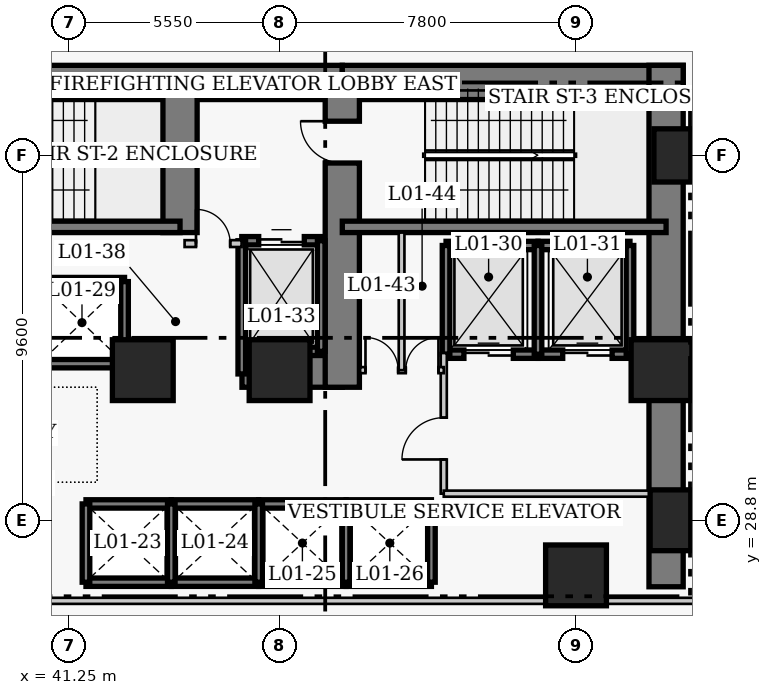
"""IFC4 building model, lengths in metres.
Left out: names, types, materials, properties, quantities, classifications, styles, units other than length and angle.
Written with IfcOpenShell. Run it as: python <this file> out.ifc"""

import sys

from ifc_helpers import new_model, si_unit, direction, frame, frame_2d, origin, origin_2d, place, context, subcontext, project, spatial, rectangle, extrude, element, fill, save


model = new_model("IFC4")
c1 = context("Model", 3, precision=1e-05, world=origin(), true_north=direction((0.0, 1.0)))
c2 = subcontext(c1, "Body", "Model", "MODEL_VIEW")
j1 = project(units=[si_unit("LENGTHUNIT", "METRE"), si_unit("PLANEANGLEUNIT", "RADIAN")], contexts=[c1])
p1 = place(None, origin())
s1 = spatial("IfcSite", under=j1, at=p1, CompositionType="ELEMENT")
p2 = place(p1, origin())
s2 = spatial("IfcBuilding", under=s1, at=p2, CompositionType="ELEMENT")
p3 = place(p2, frame((0.0, 0.0, 5.4)))
s3 = spatial("IfcBuildingStorey", under=s2, at=p3, CompositionType="ELEMENT", Elevation=5.4)
p4 = place(p3, frame((35.85, 40.32, 0.0), z_axis=(0.0, 0.0, 1.0), x_axis=(1.0, 0.0, 0.0)))
e1 = element("IfcWall", 1, at=p4, inside=s3, PredefinedType="SHEAR", context=c2, shape_type="SweptSolid", body=[
    extrude(rectangle(XDim=12.6, YDim=0.9, at=frame_2d((6.3, 0.0))), origin(), (0.0, 0.0, 1.0), 5.0),
])
p5 = place(p3, frame((48.45, 40.32, 0.0), z_axis=(0.0, 0.0, 1.0), x_axis=(1.0, 0.0, 0.0)))
e2 = element("IfcWall", 2, at=p5, inside=s3, PredefinedType="SHEAR", context=c2, shape_type="SweptSolid", body=[
    extrude(rectangle(XDim=8.97, YDim=0.9, at=frame_2d((4.485, 0.0))), origin(), (0.0, 0.0, 1.0), 5.0),
])
p6 = place(p3, frame((56.97, 27.05, 0.0), z_axis=(0.0, 0.0, 1.0), x_axis=(0.0, 1.0, 0.0)))
e3 = element("IfcWall", 3, at=p6, inside=s3, PredefinedType="SHEAR", context=c2, shape_type="SweptSolid", body=[
    extrude(rectangle(XDim=13.72, YDim=0.9, at=frame_2d((6.86, 0.0))), origin(), (0.0, 0.0, 1.0), 5.0),
])
p7 = place(p3, frame((45.81, 32.75, 0.0), z_axis=(0.0, 0.0, 1.0), x_axis=(1.0, 0.0, 0.0)))
e4 = element("IfcWall", 4, at=p7, inside=s3, PredefinedType="SHEAR", context=c2, shape_type="SweptSolid", body=[
    extrude(rectangle(XDim=2.64, YDim=0.9, at=frame_2d((1.32, 0.0))), origin(), (0.0, 0.0, 1.0), 5.0),
])
p8 = place(p3, frame((44.18, 36.37, 0.0), z_axis=(0.0, 0.0, 1.0), x_axis=(0.0, 1.0, 0.0)))
e5 = element("IfcWall", 5, at=p8, inside=s3, PredefinedType="SHEAR", context=c2, shape_type="SweptSolid", body=[
    extrude(rectangle(XDim=3.95, YDim=0.9, at=frame_2d((1.975, 0.0))), origin(), (0.0, 0.0, 1.0), 5.0),
])
p9 = place(p3, frame((48.45, 32.3, 0.0), z_axis=(0.0, 0.0, 1.0), x_axis=(0.0, 1.0, 0.0)))
e6 = element("IfcWall", 6, at=p9, inside=s3, PredefinedType="SHEAR", context=c2, shape_type="SweptSolid", body=[
    extrude(rectangle(XDim=8.02, YDim=0.9, at=frame_2d((4.01, 0.0))), origin(), (0.0, 0.0, 1.0), 5.0),
])
p10 = place(p9, frame((5.9, 0.0, 0.0)))
e7 = element("IfcOpeningElement", 7, at=p10, cuts=e6, PredefinedType="OPENING", context=c2, shape_type="SweptSolid", body=[
    extrude(rectangle(XDim=1.1, YDim=2.15, at=frame_2d((0.55, 1.075))), frame((0.0, 0.46, 0.0), z_axis=(0.0, -1.0, 0.0), x_axis=(1.0, 0.0, 0.0)), (0.0, 0.0, 1.0), 0.92),
])
p11 = place(p3, frame((35.85, 36.52, 0.0), z_axis=(0.0, 0.0, 1.0), x_axis=(1.0, 0.0, 0.0)))
e8 = element("IfcWall", 8, at=p11, inside=s3, PredefinedType="SHEAR", context=c2, shape_type="SweptSolid", body=[
    extrude(rectangle(XDim=8.33, YDim=0.3, at=frame_2d((4.165, 0.0))), origin(), (0.0, 0.0, 1.0), 5.0),
])
p12 = place(p3, frame((48.45, 36.52, 0.0), z_axis=(0.0, 0.0, 1.0), x_axis=(1.0, 0.0, 0.0)))
e9 = element("IfcWall", 9, at=p12, inside=s3, PredefinedType="SHEAR", context=c2, shape_type="SweptSolid", body=[
    extrude(rectangle(XDim=8.52, YDim=0.3, at=frame_2d((4.26, 0.0))), origin(), (0.0, 0.0, 1.0), 5.0),
])
p13 = place(p3, frame((57.35, 28.8, 0.0), z_axis=(0.0, 0.0, 1.0), x_axis=(1.0, 0.0, 0.0)))
e10 = element("IfcColumn", 10, at=p13, inside=s3, PredefinedType="COLUMN", context=c2, shape_type="SweptSolid", body=[
    extrude(rectangle(XDim=1.6, YDim=1.6, at=origin_2d()), origin(), (0.0, 0.0, 1.0), 5.0),
])
p14 = place(p3, frame((57.35, 38.4, 0.0), z_axis=(0.0, 0.0, 1.0), x_axis=(1.0, 0.0, 0.0)))
e11 = element("IfcColumn", 11, at=p14, inside=s3, PredefinedType="COLUMN", context=c2, shape_type="SweptSolid", body=[
    extrude(rectangle(XDim=1.4, YDim=1.4, at=origin_2d()), origin(), (0.0, 0.0, 1.0), 5.0),
])
for number, where, z_axis, x_axis in (
    (12, (43.2, 32.75, 0.0), (0.0, 0.0, 1.0), (1.0, 0.0, 0.0)),
    (13, (46.8, 32.75, 0.0), (0.0, 0.0, 1.0), (1.0, 0.0, 0.0)),
    (14, (54.6, 27.35, 0.0), (0.0, 0.0, 1.0), (1.0, 0.0, 0.0)),
    (15, (56.85, 32.75, 0.0), (0.0, 0.0, 1.0), (1.0, 0.0, 0.0)),
):
    element("IfcColumn", number, at=place(p3, frame(where, z_axis=z_axis, x_axis=x_axis)), inside=s3, PredefinedType="COLUMN", context=c2, shape_type="SweptSolid", body=[
        extrude(rectangle(XDim=1.6, YDim=1.6, at=origin_2d()), origin(), (0.0, 0.0, 1.0), 5.0),
    ])
for number, where, z_axis, x_axis in (
    (16, (41.705, 29.23, 0.0), (0.0, 0.0, 1.0), (1.0, 0.0, 0.0)),
    (17, (41.705, 27.17, 0.0), (0.0, 0.0, 1.0), (1.0, 0.0, 0.0)),
):
    element("IfcWall", number, at=place(p3, frame(where, z_axis=z_axis, x_axis=x_axis)), inside=s3, PredefinedType="SHEAR", context=c2, shape_type="SweptSolid", body=[
        extrude(rectangle(XDim=2.245, YDim=0.22, at=frame_2d((1.123, 0.0))), origin(), (0.0, 0.0, 1.0), 5.0),
    ])
p15 = place(p3, frame((41.705, 27.17, 0.0), z_axis=(0.0, 0.0, 1.0), x_axis=(0.0, 1.0, 0.0)))
e18 = element("IfcWall", 18, at=p15, inside=s3, PredefinedType="SHEAR", context=c2, shape_type="SweptSolid", body=[
    extrude(rectangle(XDim=2.06, YDim=0.2, at=frame_2d((1.03, 0.0))), origin(), (0.0, 0.0, 1.0), 5.0),
])
for number, where, z_axis, x_axis in (
    (19, (43.95, 29.23, 0.0), (0.0, 0.0, 1.0), (1.0, 0.0, 0.0)),
    (20, (43.95, 27.17, 0.0), (0.0, 0.0, 1.0), (1.0, 0.0, 0.0)),
):
    element("IfcWall", number, at=place(p3, frame(where, z_axis=z_axis, x_axis=x_axis)), inside=s3, PredefinedType="SHEAR", context=c2, shape_type="SweptSolid", body=[
        extrude(rectangle(XDim=2.3, YDim=0.22, at=frame_2d((1.15, 0.0))), origin(), (0.0, 0.0, 1.0), 5.0),
    ])
p16 = place(p3, frame((43.95, 27.17, 0.0), z_axis=(0.0, 0.0, 1.0), x_axis=(0.0, 1.0, 0.0)))
e21 = element("IfcWall", 21, at=p16, inside=s3, PredefinedType="SHEAR", context=c2, shape_type="SweptSolid", body=[
    extrude(rectangle(XDim=2.06, YDim=0.2, at=frame_2d((1.03, 0.0))), origin(), (0.0, 0.0, 1.0), 5.0),
])
for number, where, z_axis, x_axis in (
    (22, (46.25, 29.23, 0.0), (0.0, 0.0, 1.0), (1.0, 0.0, 0.0)),
    (23, (46.25, 27.17, 0.0), (0.0, 0.0, 1.0), (1.0, 0.0, 0.0)),
):
    element("IfcWall", number, at=place(p3, frame(where, z_axis=z_axis, x_axis=x_axis)), inside=s3, PredefinedType="SHEAR", context=c2, shape_type="SweptSolid", body=[
        extrude(rectangle(XDim=2.3, YDim=0.22, at=frame_2d((1.15, 0.0))), origin(), (0.0, 0.0, 1.0), 5.0),
    ])
p17 = place(p3, frame((46.25, 27.17, 0.0), z_axis=(0.0, 0.0, 1.0), x_axis=(0.0, 1.0, 0.0)))
e24 = element("IfcWall", 24, at=p17, inside=s3, PredefinedType="SHEAR", context=c2, shape_type="SweptSolid", body=[
    extrude(rectangle(XDim=2.06, YDim=0.2, at=frame_2d((1.03, 0.0))), origin(), (0.0, 0.0, 1.0), 5.0),
])
for number, where, z_axis, x_axis in (
    (25, (48.55, 29.23, 0.0), (0.0, 0.0, 1.0), (1.0, 0.0, 0.0)),
    (26, (48.55, 27.17, 0.0), (0.0, 0.0, 1.0), (1.0, 0.0, 0.0)),
):
    element("IfcWall", number, at=place(p3, frame(where, z_axis=z_axis, x_axis=x_axis)), inside=s3, PredefinedType="SHEAR", context=c2, shape_type="SweptSolid", body=[
        extrude(rectangle(XDim=2.245, YDim=0.22, at=frame_2d((1.123, 0.0))), origin(), (0.0, 0.0, 1.0), 5.0),
    ])
for number, where, z_axis, x_axis in (
    (27, (48.55, 27.17, 0.0), (0.0, 0.0, 1.0), (0.0, 1.0, 0.0)),
    (28, (50.795, 27.17, 0.0), (0.0, 0.0, 1.0), (0.0, 1.0, 0.0)),
):
    element("IfcWall", number, at=place(p3, frame(where, z_axis=z_axis, x_axis=x_axis)), inside=s3, PredefinedType="SHEAR", context=c2, shape_type="SweptSolid", body=[
        extrude(rectangle(XDim=2.06, YDim=0.2, at=frame_2d((1.03, 0.0))), origin(), (0.0, 0.0, 1.0), 5.0),
    ])
for number, where, z_axis, x_axis in (
    (29, (40.4, 35.08, 0.0), (0.0, 0.0, 1.0), (1.0, 0.0, 0.0)),
    (30, (40.4, 32.92, 0.0), (0.0, 0.0, 1.0), (1.0, 0.0, 0.0)),
):
    element("IfcWall", number, at=place(p3, frame(where, z_axis=z_axis, x_axis=x_axis)), inside=s3, PredefinedType="SHEAR", context=c2, shape_type="SweptSolid", body=[
        extrude(rectangle(XDim=2.32, YDim=0.22, at=frame_2d((1.16, 0.0))), origin(), (0.0, 0.0, 1.0), 5.0),
    ])
p18 = place(p3, frame((42.72, 32.92, 0.0), z_axis=(0.0, 0.0, 1.0), x_axis=(0.0, 1.0, 0.0)))
e31 = element("IfcWall", 31, at=p18, inside=s3, PredefinedType="SHEAR", context=c2, shape_type="SweptSolid", body=[
    extrude(rectangle(XDim=2.16, YDim=0.2, at=frame_2d((1.08, 0.0))), origin(), (0.0, 0.0, 1.0), 5.0),
])
p19 = place(p3, frame((51.18, 36.03, 0.0), z_axis=(0.0, 0.0, 1.0), x_axis=(1.0, 0.0, 0.0)))
e32 = element("IfcWall", 32, at=p19, inside=s3, PredefinedType="SHEAR", context=c2, shape_type="SweptSolid", body=[
    extrude(rectangle(XDim=2.42, YDim=0.22, at=frame_2d((1.21, 0.0))), origin(), (0.0, 0.0, 1.0), 5.0),
])
p20 = place(p3, frame((51.18, 33.17, 0.0), z_axis=(0.0, 0.0, 1.0), x_axis=(1.0, 0.0, 0.0)))
e33 = element("IfcWall", 33, at=p20, inside=s3, PredefinedType="SHEAR", context=c2, shape_type="SweptSolid", body=[
    extrude(rectangle(XDim=2.42, YDim=0.22, at=frame_2d((1.21, 0.0))), origin(), (0.0, 0.0, 1.0), 5.0),
])
p21 = place(p20, frame((0.47, 0.0, 0.0)))
e34 = element("IfcOpeningElement", 34, at=p21, cuts=e33, PredefinedType="OPENING", context=c2, shape_type="SweptSolid", body=[
    extrude(rectangle(XDim=1.3, YDim=2.15, at=frame_2d((0.65, 1.075))), frame((0.0, 0.12, 0.0), z_axis=(0.0, -1.0, 0.0), x_axis=(1.0, 0.0, 0.0)), (0.0, 0.0, 1.0), 0.24),
])
p22 = place(p3, frame((51.18, 33.17, 0.0), z_axis=(0.0, 0.0, 1.0), x_axis=(0.0, 1.0, 0.0)))
e35 = element("IfcWall", 35, at=p22, inside=s3, PredefinedType="SHEAR", context=c2, shape_type="SweptSolid", body=[
    extrude(rectangle(XDim=2.86, YDim=0.2, at=frame_2d((1.43, 0.0))), origin(), (0.0, 0.0, 1.0), 5.0),
])
p23 = place(p3, frame((53.6, 36.03, 0.0), z_axis=(0.0, 0.0, 1.0), x_axis=(1.0, 0.0, 0.0)))
e36 = element("IfcWall", 36, at=p23, inside=s3, PredefinedType="SHEAR", context=c2, shape_type="SweptSolid", body=[
    extrude(rectangle(XDim=2.42, YDim=0.22, at=frame_2d((1.21, 0.0))), origin(), (0.0, 0.0, 1.0), 5.0),
])
p24 = place(p3, frame((53.6, 33.17, 0.0), z_axis=(0.0, 0.0, 1.0), x_axis=(1.0, 0.0, 0.0)))
e37 = element("IfcWall", 37, at=p24, inside=s3, PredefinedType="SHEAR", context=c2, shape_type="SweptSolid", body=[
    extrude(rectangle(XDim=2.42, YDim=0.22, at=frame_2d((1.21, 0.0))), origin(), (0.0, 0.0, 1.0), 5.0),
])
p25 = place(p24, frame((0.65, 0.0, 0.0)))
e38 = element("IfcOpeningElement", 38, at=p25, cuts=e37, PredefinedType="OPENING", context=c2, shape_type="SweptSolid", body=[
    extrude(rectangle(XDim=1.3, YDim=2.15, at=frame_2d((0.65, 1.075))), frame((0.0, 0.12, 0.0), z_axis=(0.0, -1.0, 0.0), x_axis=(1.0, 0.0, 0.0)), (0.0, 0.0, 1.0), 0.24),
])
for number, where, z_axis, x_axis in (
    (39, (53.6, 33.17, 0.0), (0.0, 0.0, 1.0), (0.0, 1.0, 0.0)),
    (40, (56.02, 33.17, 0.0), (0.0, 0.0, 1.0), (0.0, 1.0, 0.0)),
):
    element("IfcWall", number, at=place(p3, frame(where, z_axis=z_axis, x_axis=x_axis)), inside=s3, PredefinedType="SHEAR", context=c2, shape_type="SweptSolid", body=[
        extrude(rectangle(XDim=2.86, YDim=0.2, at=frame_2d((1.43, 0.0))), origin(), (0.0, 0.0, 1.0), 5.0),
    ])
p26 = place(p3, frame((45.805, 36.155, 0.0), z_axis=(0.0, 0.0, 1.0), x_axis=(1.0, 0.0, 0.0)))
e41 = element("IfcWall", 41, at=p26, inside=s3, PredefinedType="SHEAR", context=c2, shape_type="SweptSolid", body=[
    extrude(rectangle(XDim=2.09, YDim=0.22, at=frame_2d((1.045, 0.0))), origin(), (0.0, 0.0, 1.0), 5.0),
])
p27 = place(p26, frame((0.445, 0.0, 0.0)))
e42 = element("IfcOpeningElement", 42, at=p27, cuts=e41, PredefinedType="OPENING", context=c2, shape_type="SweptSolid", body=[
    extrude(rectangle(XDim=1.2, YDim=2.15, at=frame_2d((0.6, 1.075))), frame((0.0, 0.12, 0.0), z_axis=(0.0, -1.0, 0.0), x_axis=(1.0, 0.0, 0.0)), (0.0, 0.0, 1.0), 0.24),
])
p28 = place(p3, frame((45.805, 33.245, 0.0), z_axis=(0.0, 0.0, 1.0), x_axis=(1.0, 0.0, 0.0)))
e43 = element("IfcWall", 43, at=p28, inside=s3, PredefinedType="SHEAR", context=c2, shape_type="SweptSolid", body=[
    extrude(rectangle(XDim=2.09, YDim=0.22, at=frame_2d((1.045, 0.0))), origin(), (0.0, 0.0, 1.0), 5.0),
])
p29 = place(p3, frame((45.805, 32.65, 0.0), z_axis=(0.0, 0.0, 1.0), x_axis=(0.0, 1.0, 0.0)))
e44 = element("IfcWall", 44, at=p29, inside=s3, PredefinedType="SHEAR", context=c2, shape_type="SweptSolid", body=[
    extrude(rectangle(XDim=3.505, YDim=0.2, at=frame_2d((1.752, 0.0))), origin(), (0.0, 0.0, 1.0), 5.0),
])
p30 = place(p3, frame((47.895, 33.245, 0.0), z_axis=(0.0, 0.0, 1.0), x_axis=(0.0, 1.0, 0.0)))
e45 = element("IfcWall", 45, at=p30, inside=s3, PredefinedType="SHEAR", context=c2, shape_type="SweptSolid", body=[
    extrude(rectangle(XDim=2.91, YDim=0.2, at=frame_2d((1.455, 0.0))), origin(), (0.0, 0.0, 1.0), 5.0),
])
p31 = place(p3, frame((44.3, 36.08, 0.0), z_axis=(0.0, 0.0, 1.0), x_axis=(1.0, 0.0, 0.0)))
e46 = element("IfcWall", 46, at=p31, inside=s3, PredefinedType="PARTITIONING", context=c2, shape_type="SweptSolid", body=[
    extrude(rectangle(XDim=1.5, YDim=0.18, at=frame_2d((0.75, 0.0))), origin(), (0.0, 0.0, 1.0), 4.65),
])
p32 = place(p31, frame((0.3, 0.0, 0.0)))
e47 = element("IfcOpeningElement", 47, at=p32, cuts=e46, PredefinedType="OPENING", context=c2, shape_type="SweptSolid", body=[
    extrude(rectangle(XDim=0.9, YDim=2.15, at=frame_2d((0.45, 1.075))), frame((0.0, 0.1, 0.0), z_axis=(0.0, -1.0, 0.0), x_axis=(1.0, 0.0, 0.0)), (0.0, 0.0, 1.0), 0.2),
])
p33 = place(p3, frame((51.12, 29.5, 0.0), z_axis=(0.0, 0.0, 1.0), x_axis=(0.0, 1.0, 0.0)))
e48 = element("IfcWall", 48, at=p33, inside=s3, PredefinedType="PARTITIONING", context=c2, shape_type="SweptSolid", body=[
    extrude(rectangle(XDim=3.7, YDim=0.16, at=frame_2d((1.85, 0.0))), origin(), (0.0, 0.0, 1.0), 4.65),
])
p34 = place(p33, frame((0.9, 0.0, 0.0)))
e49 = element("IfcOpeningElement", 49, at=p34, cuts=e48, PredefinedType="OPENING", context=c2, shape_type="SweptSolid", body=[
    extrude(rectangle(XDim=1.1, YDim=2.15, at=frame_2d((0.55, 1.075))), frame((0.0, 0.09, 0.0), z_axis=(0.0, -1.0, 0.0), x_axis=(1.0, 0.0, 0.0)), (0.0, 0.0, 1.0), 0.18),
])
p35 = place(p3, frame((51.12, 29.5, 0.0), z_axis=(0.0, 0.0, 1.0), x_axis=(1.0, 0.0, 0.0)))
e50 = element("IfcWall", 50, at=p35, inside=s3, PredefinedType="PARTITIONING", context=c2, shape_type="SweptSolid", body=[
    extrude(rectangle(XDim=5.63, YDim=0.16, at=frame_2d((2.815, 0.0))), origin(), (0.0, 0.0, 1.0), 4.65),
])
p36 = place(p3, frame((48.92, 32.75, 0.0), z_axis=(0.0, 0.0, 1.0), x_axis=(1.0, 0.0, 0.0)))
e51 = element("IfcWall", 51, at=p36, inside=s3, PredefinedType="PARTITIONING", context=c2, shape_type="SweptSolid", body=[
    extrude(rectangle(XDim=2.2, YDim=0.16, at=frame_2d((1.1, 0.0))), origin(), (0.0, 0.0, 1.0), 4.65),
])
p37 = place(p36, frame((0.14, 0.0, 0.0)))
e52 = element("IfcOpeningElement", 52, at=p37, cuts=e51, PredefinedType="OPENING", context=c2, shape_type="SweptSolid", body=[
    extrude(rectangle(XDim=0.86, YDim=2.05, at=frame_2d((0.43, 1.025))), frame((0.0, 0.09, 0.0), z_axis=(0.0, -1.0, 0.0), x_axis=(1.0, 0.0, 0.0)), (0.0, 0.0, 1.0), 0.18),
])
p38 = place(p36, frame((1.2, 0.0, 0.0)))
e53 = element("IfcOpeningElement", 53, at=p38, cuts=e51, PredefinedType="OPENING", context=c2, shape_type="SweptSolid", body=[
    extrude(rectangle(XDim=0.86, YDim=2.05, at=frame_2d((0.43, 1.025))), frame((0.0, 0.09, 0.0), z_axis=(0.0, -1.0, 0.0), x_axis=(1.0, 0.0, 0.0)), (0.0, 0.0, 1.0), 0.18),
])
p39 = place(p3, frame((50.01, 32.75, 0.0), z_axis=(0.0, 0.0, 1.0), x_axis=(0.0, 1.0, 0.0)))
e54 = element("IfcWall", 54, at=p39, inside=s3, PredefinedType="PARTITIONING", context=c2, shape_type="SweptSolid", body=[
    extrude(rectangle(XDim=3.62, YDim=0.15, at=frame_2d((1.81, 0.0))), origin(), (0.0, 0.0, 1.0), 4.65),
])
p40 = place(p3, frame((-2.98, 26.68, 0.0), z_axis=(0.0, 0.0, 1.0), x_axis=(1.0, 0.0, 0.0)))
e55 = element("IfcWall", 55, at=p40, inside=s3, PredefinedType="PARTITIONING", context=c2, shape_type="SweptSolid", body=[
    extrude(rectangle(XDim=83.96, YDim=0.16, at=frame_2d((41.98, 0.0))), origin(), (0.0, 0.0, 1.0), 4.65),
])
p41 = place(p40, frame((41.08, 0.0, 0.0)))
e56 = element("IfcOpeningElement", 56, at=p41, cuts=e55, PredefinedType="OPENING", context=c2, shape_type="SweptSolid", body=[
    extrude(rectangle(XDim=1.8, YDim=2.2, at=frame_2d((0.9, 1.1))), frame((0.0, 0.09, 0.0), z_axis=(0.0, -1.0, 0.0), x_axis=(1.0, 0.0, 0.0)), (0.0, 0.0, 1.0), 0.18),
])
p42 = place(p40, frame((4.042, 0.0, 0.0)))
e57 = element("IfcOpeningElement", 57, at=p42, cuts=e55, PredefinedType="OPENING", context=c2, shape_type="SweptSolid", body=[
    extrude(rectangle(XDim=1.8, YDim=2.2, at=frame_2d((0.9, 1.1))), frame((0.0, 0.09, 0.0), z_axis=(0.0, -1.0, 0.0), x_axis=(1.0, 0.0, 0.0)), (0.0, 0.0, 1.0), 0.18),
])
p43 = place(p40, frame((61.48, 0.0, 0.0)))
e58 = element("IfcOpeningElement", 58, at=p43, cuts=e55, PredefinedType="OPENING", context=c2, shape_type="SweptSolid", body=[
    extrude(rectangle(XDim=1.8, YDim=2.2, at=frame_2d((0.9, 1.1))), frame((0.0, 0.09, 0.0), z_axis=(0.0, -1.0, 0.0), x_axis=(1.0, 0.0, 0.0)), (0.0, 0.0, 1.0), 0.18),
])
p44 = place(p21, origin())
e59 = element("IfcDoor", 59, at=p44, inside=s3, OperationType="DOUBLE_DOOR_SLIDING", PredefinedType="DOOR", context=c2, shape_type="SweptSolid", body=[
    extrude(rectangle(XDim=1.3, YDim=2.15, at=frame_2d((0.65, 1.075))), frame((0.0, 0.025, 0.0), z_axis=(0.0, -1.0, 0.0), x_axis=(1.0, 0.0, 0.0)), (0.0, 0.0, 1.0), 0.05),
])
fill(e34, e59)
p45 = place(p25, origin())
e60 = element("IfcDoor", 60, at=p45, inside=s3, OperationType="DOUBLE_DOOR_SLIDING", PredefinedType="DOOR", context=c2, shape_type="SweptSolid", body=[
    extrude(rectangle(XDim=1.3, YDim=2.15, at=frame_2d((0.65, 1.075))), frame((0.0, 0.025, 0.0), z_axis=(0.0, -1.0, 0.0), x_axis=(1.0, 0.0, 0.0)), (0.0, 0.0, 1.0), 0.05),
])
fill(e38, e60)
p46 = place(p27, origin())
e61 = element("IfcDoor", 61, at=p46, inside=s3, OperationType="DOUBLE_DOOR_SLIDING", PredefinedType="DOOR", context=c2, shape_type="SweptSolid", body=[
    extrude(rectangle(XDim=1.2, YDim=2.15, at=frame_2d((0.6, 1.075))), frame((0.0, 0.025, 0.0), z_axis=(0.0, -1.0, 0.0), x_axis=(1.0, 0.0, 0.0)), (0.0, 0.0, 1.0), 0.05),
])
fill(e42, e61)
p47 = place(p32, origin())
e62 = element("IfcDoor", 62, at=p47, inside=s3, OperationType="SINGLE_SWING_LEFT", PredefinedType="DOOR", context=c2, shape_type="SweptSolid", body=[
    extrude(rectangle(XDim=0.9, YDim=2.15, at=frame_2d((0.45, 1.075))), frame((0.0, 0.025, 0.0), z_axis=(0.0, -1.0, 0.0), x_axis=(1.0, 0.0, 0.0)), (0.0, 0.0, 1.0), 0.05),
])
fill(e47, e62)
p48 = place(p34, origin())
e63 = element("IfcDoor", 63, at=p48, inside=s3, OperationType="SINGLE_SWING_LEFT", PredefinedType="DOOR", context=c2, shape_type="SweptSolid", body=[
    extrude(rectangle(XDim=1.1, YDim=2.15, at=frame_2d((0.55, 1.075))), frame((0.0, 0.025, 0.0), z_axis=(0.0, -1.0, 0.0), x_axis=(1.0, 0.0, 0.0)), (0.0, 0.0, 1.0), 0.05),
])
fill(e49, e63)
p49 = place(p37, origin())
e64 = element("IfcDoor", 64, at=p49, inside=s3, OperationType="SINGLE_SWING_LEFT", PredefinedType="DOOR", context=c2, shape_type="SweptSolid", body=[
    extrude(rectangle(XDim=0.86, YDim=2.05, at=frame_2d((0.43, 1.025))), frame((0.0, 0.025, 0.0), z_axis=(0.0, -1.0, 0.0), x_axis=(1.0, 0.0, 0.0)), (0.0, 0.0, 1.0), 0.05),
])
fill(e52, e64)
p50 = place(p38, origin())
e65 = element("IfcDoor", 65, at=p50, inside=s3, OperationType="SINGLE_SWING_RIGHT", PredefinedType="DOOR", context=c2, shape_type="SweptSolid", body=[
    extrude(rectangle(XDim=0.86, YDim=2.05, at=frame_2d((0.43, 1.025))), frame((0.0, 0.025, 0.0), z_axis=(0.0, -1.0, 0.0), x_axis=(1.0, 0.0, 0.0)), (0.0, 0.0, 1.0), 0.05),
])
fill(e53, e65)
p51 = place(p10, origin())
e66 = element("IfcDoor", 66, at=p51, inside=s3, OperationType="SINGLE_SWING_RIGHT", PredefinedType="DOOR", context=c2, shape_type="SweptSolid", body=[
    extrude(rectangle(XDim=1.1, YDim=2.15, at=frame_2d((0.55, 1.075))), frame((0.0, 0.025, 0.0), z_axis=(0.0, -1.0, 0.0), x_axis=(1.0, 0.0, 0.0)), (0.0, 0.0, 1.0), 0.05),
])
fill(e7, e66)
save(model, sys.argv[1])
